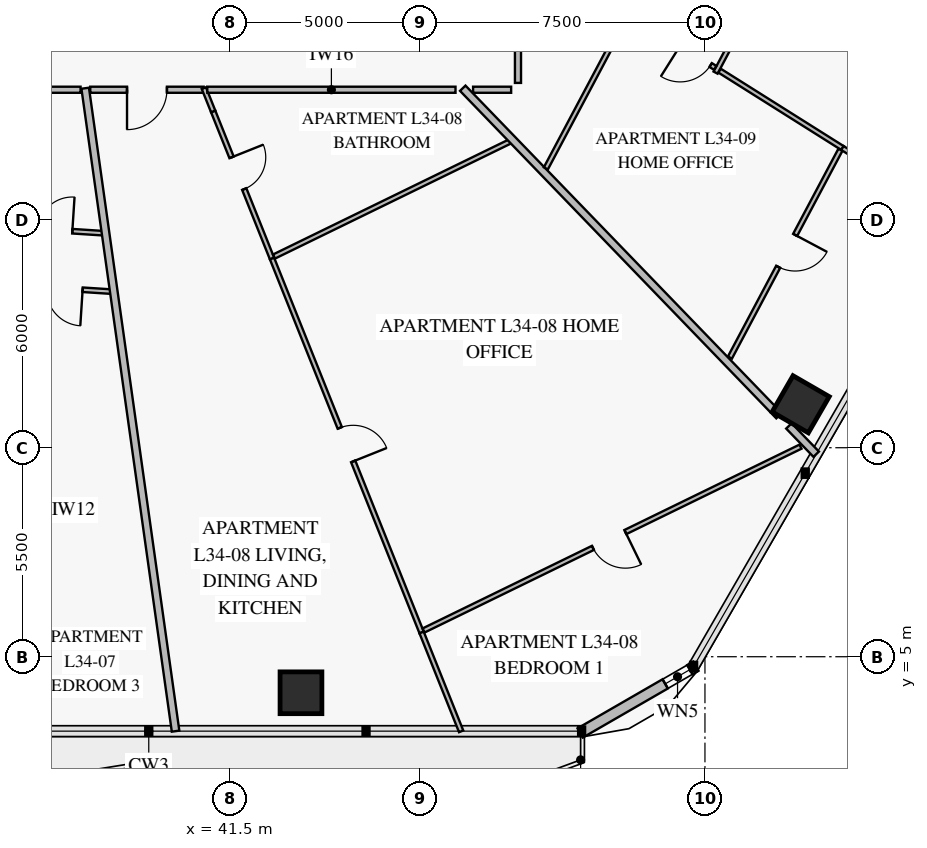
"""IFC4 building model, lengths in metres.
Left out: names, types, materials, properties, quantities, classifications, styles, units other than length and angle.
Written with IfcOpenShell. Run it as: python <this file> out.ifc"""

import sys

from ifc_helpers import new_model, si_unit, direction, frame, frame_2d, origin, origin_2d, place, context, subcontext, project, spatial, rectangle, extrude, element, fill, save


model = new_model("IFC4")
c1 = context("Model", 3, precision=1e-05, world=origin(), true_north=direction((0.0, 1.0)))
c2 = subcontext(c1, "Body", "Model", "MODEL_VIEW")
j1 = project(units=[si_unit("LENGTHUNIT", "METRE"), si_unit("PLANEANGLEUNIT", "RADIAN")], contexts=[c1])
p1 = place(None, origin())
s1 = spatial("IfcSite", under=j1, at=p1, CompositionType="ELEMENT")
p2 = place(p1, origin())
s2 = spatial("IfcBuilding", under=s1, at=p2, CompositionType="ELEMENT")
p3 = place(p2, frame((0.0, 0.0, 138.0)))
s3 = spatial("IfcBuildingStorey", under=s2, at=p3, CompositionType="ELEMENT", Elevation=138.0)
for number, where, z_axis, x_axis in (
    (1, (43.37, 4.052, 0.0), (0.0, 0.0, 1.0), (1.0, 0.0, 0.0)),
    (2, (56.519, 11.643, 0.0), (0.0, 0.0, 1.0), (0.5, 0.866, 0.0)),
):
    element("IfcColumn", number, at=place(p3, frame(where, z_axis=z_axis, x_axis=x_axis)), inside=s3, PredefinedType="COLUMN", context=c2, shape_type="SweptSolid", body=[
        extrude(rectangle(XDim=1.1, YDim=1.1, at=origin_2d()), origin(), (0.0, 0.0, 1.0), 3.55),
    ])
p4 = place(p3, frame((53.761, 4.751, 0.0), z_axis=(0.0, 0.0, 1.0), x_axis=(-0.866007452331, -0.500031091541, 0.0)))
e3 = element("IfcWall", 3, at=p4, inside=s3, PredefinedType="SOLIDWALL", context=c2, shape_type="SweptSolid", body=[
    extrude(rectangle(XDim=3.515, YDim=0.28, at=frame_2d((1.757, 0.0))), origin(), (0.0, 0.0, 1.0), 3.55),
])
p5 = place(p4, frame((0.182, 0.0, 0.85)))
e4 = element("IfcOpeningElement", 4, at=p5, cuts=e3, PredefinedType="OPENING", context=c2, shape_type="SweptSolid", body=[
    extrude(rectangle(XDim=0.75, YDim=1.5, at=frame_2d((0.375, 0.75))), frame((0.0, 0.152, 0.0), z_axis=(0.0, -1.0, 0.0), x_axis=(1.0, 0.0, 0.0)), (0.0, 0.0, 1.0), 0.304),
])
p6 = place(p3, frame((31.788, 16.557, 0.0), z_axis=(0.0, 0.0, 1.0), x_axis=(0.997916701545, -0.064515554547, 0.0)))
e5 = element("IfcWall", 5, at=p6, inside=s3, PredefinedType="PARTITIONING", context=c2, shape_type="SweptSolid", body=[
    extrude(rectangle(XDim=6.414, YDim=0.12, at=frame_2d((3.207, 0.0))), origin(), (0.0, 0.0, 1.0), 2.85),
])
p7 = place(p6, frame((1.548, 0.0, 0.0)))
e6 = element("IfcOpeningElement", 6, at=p7, cuts=e5, PredefinedType="OPENING", context=c2, shape_type="SweptSolid", body=[
    extrude(rectangle(XDim=0.95, YDim=2.1, at=frame_2d((0.475, 1.05))), frame((0.0, 0.072, 0.0), z_axis=(0.0, -1.0, 0.0), x_axis=(1.0, 0.0, 0.0)), (0.0, 0.0, 1.0), 0.144),
])
p8 = place(p6, frame((4.678, 0.0, 0.0)))
e7 = element("IfcOpeningElement", 7, at=p8, cuts=e5, PredefinedType="OPENING", context=c2, shape_type="SweptSolid", body=[
    extrude(rectangle(XDim=0.9, YDim=2.1, at=frame_2d((0.45, 1.05))), frame((0.0, 0.072, 0.0), z_axis=(0.0, -1.0, 0.0), x_axis=(1.0, 0.0, 0.0)), (0.0, 0.0, 1.0), 0.144),
])
p9 = place(p3, frame((31.389, 15.06, 0.0), z_axis=(0.0, 0.0, 1.0), x_axis=(0.997916790239, -0.064514182617, 0.0)))
e8 = element("IfcWall", 8, at=p9, inside=s3, PredefinedType="PARTITIONING", context=c2, shape_type="SweptSolid", body=[
    extrude(rectangle(XDim=7.016, YDim=0.12, at=frame_2d((3.508, 0.0))), origin(), (0.0, 0.0, 1.0), 2.85),
])
p10 = place(p9, frame((0.768, 0.0, 0.0)))
e9 = element("IfcOpeningElement", 9, at=p10, cuts=e8, PredefinedType="OPENING", context=c2, shape_type="SweptSolid", body=[
    extrude(rectangle(XDim=0.95, YDim=2.1, at=frame_2d((0.475, 1.05))), frame((0.0, 0.072, 0.0), z_axis=(0.0, -1.0, 0.0), x_axis=(1.0, 0.0, 0.0)), (0.0, 0.0, 1.0), 0.144),
])
p11 = place(p9, frame((3.033, 0.0, 0.0)))
e10 = element("IfcOpeningElement", 10, at=p11, cuts=e8, PredefinedType="OPENING", context=c2, shape_type="SweptSolid", body=[
    extrude(rectangle(XDim=0.95, YDim=2.1, at=frame_2d((0.475, 1.05))), frame((0.0, 0.072, 0.0), z_axis=(0.0, -1.0, 0.0), x_axis=(1.0, 0.0, 0.0)), (0.0, 0.0, 1.0), 0.144),
])
p12 = place(p9, frame((5.298, 0.0, 0.0)))
e11 = element("IfcOpeningElement", 11, at=p12, cuts=e8, PredefinedType="OPENING", context=c2, shape_type="SweptSolid", body=[
    extrude(rectangle(XDim=0.95, YDim=2.1, at=frame_2d((0.475, 1.05))), frame((0.0, 0.072, 0.0), z_axis=(0.0, -1.0, 0.0), x_axis=(1.0, 0.0, 0.0)), (0.0, 0.0, 1.0), 0.144),
])
p13 = place(p3, frame((41.06, 19.35, 0.0), z_axis=(0.0, 0.0, 1.0), x_axis=(0.371320023402, -0.928504948948, 0.0)))
e12 = element("IfcWall", 12, at=p13, inside=s3, PredefinedType="PARTITIONING", context=c2, shape_type="SweptSolid", body=[
    extrude(rectangle(XDim=4.17, YDim=0.12, at=frame_2d((2.085, 0.0))), origin(), (0.0, 0.0, 1.0), 3.55),
])
p14 = place(p13, frame((1.302, 0.0, 0.0)))
e13 = element("IfcOpeningElement", 13, at=p14, cuts=e12, PredefinedType="OPENING", context=c2, shape_type="SweptSolid", body=[
    extrude(rectangle(XDim=0.9, YDim=2.1, at=frame_2d((0.45, 1.05))), frame((0.0, 0.072, 0.0), z_axis=(0.0, -1.0, 0.0), x_axis=(1.0, 0.0, 0.0)), (0.0, 0.0, 1.0), 0.144),
])
p15 = place(p3, frame((42.608, 15.478, 0.0), z_axis=(0.0, 0.0, 1.0), x_axis=(0.371370817249, -0.928484634281, 0.0)))
e14 = element("IfcWall", 14, at=p15, inside=s3, PredefinedType="PARTITIONING", context=c2, shape_type="SweptSolid", body=[
    extrude(rectangle(XDim=10.598, YDim=0.12, at=frame_2d((5.299, 0.0))), origin(), (0.0, 0.0, 1.0), 2.8),
])
p16 = place(p15, frame((4.799, 0.0, 0.0)))
e15 = element("IfcOpeningElement", 15, at=p16, cuts=e14, PredefinedType="OPENING", context=c2, shape_type="SweptSolid", body=[
    extrude(rectangle(XDim=0.95, YDim=2.1, at=frame_2d((0.475, 1.05))), frame((0.0, 0.072, 0.0), z_axis=(0.0, -1.0, 0.0), x_axis=(1.0, 0.0, 0.0)), (0.0, 0.0, 1.0), 0.144),
])
p17 = place(p3, frame((46.596, 5.691, 0.0), z_axis=(0.0, 0.0, 1.0), x_axis=(0.898799700949, 0.438359552848, 0.0)))
e16 = element("IfcWall", 16, at=p17, inside=s3, PredefinedType="PARTITIONING", context=c2, shape_type="SweptSolid", body=[
    extrude(rectangle(XDim=11.035, YDim=0.12, at=frame_2d((5.517, 0.0))), origin(), (0.0, 0.0, 1.0), 2.8),
])
p18 = place(p17, frame((4.958, 0.0, 0.0)))
e17 = element("IfcOpeningElement", 17, at=p18, cuts=e16, PredefinedType="OPENING", context=c2, shape_type="SweptSolid", body=[
    extrude(rectangle(XDim=0.95, YDim=2.1, at=frame_2d((0.475, 1.05))), frame((0.0, 0.072, 0.0), z_axis=(0.0, -1.0, 0.0), x_axis=(1.0, 0.0, 0.0)), (0.0, 0.0, 1.0), 0.144),
])
p19 = place(p3, frame((37.826, 19.92, 0.0), z_axis=(0.0, 0.0, 1.0), x_axis=(1.0, 0.0, 0.0)))
e18 = element("IfcWall", 18, at=p19, inside=s3, PredefinedType="PARTITIONING", context=c2, shape_type="SweptSolid", body=[
    extrude(rectangle(XDim=2.984, YDim=0.16, at=frame_2d((1.492, 0.0))), origin(), (0.0, 0.0, 1.0), 2.85),
])
p20 = place(p19, frame((0.967, 0.0, 0.0)))
e19 = element("IfcOpeningElement", 19, at=p20, cuts=e18, PredefinedType="OPENING", context=c2, shape_type="SweptSolid", body=[
    extrude(rectangle(XDim=1.05, YDim=2.15, at=frame_2d((0.525, 1.075))), frame((0.0, 0.092, 0.0), z_axis=(0.0, -1.0, 0.0), x_axis=(1.0, 0.0, 0.0)), (0.0, 0.0, 1.0), 0.184),
])
p21 = place(p3, frame((54.28, 20.371, 0.0), z_axis=(0.0, 0.0, 1.0), x_axis=(0.469462335531, 0.882952499015, 0.0)))
e20 = element("IfcWall", 20, at=p21, inside=s3, PredefinedType="PARTITIONING", context=c2, shape_type="SweptSolid", body=[
    extrude(rectangle(XDim=8.602, YDim=0.12, at=frame_2d((4.301, 0.0))), origin(), (0.0, 0.0, 1.0), 2.85),
])
p22 = place(p21, frame((1.252, 0.0, 0.0)))
e21 = element("IfcOpeningElement", 21, at=p22, cuts=e20, PredefinedType="OPENING", context=c2, shape_type="SweptSolid", body=[
    extrude(rectangle(XDim=0.95, YDim=2.1, at=frame_2d((0.475, 1.05))), frame((0.0, 0.072, 0.0), z_axis=(0.0, -1.0, 0.0), x_axis=(1.0, 0.0, 0.0)), (0.0, 0.0, 1.0), 0.144),
])
p23 = place(p21, frame((5.313, 0.0, 0.0)))
e22 = element("IfcOpeningElement", 22, at=p23, cuts=e20, PredefinedType="OPENING", context=c2, shape_type="SweptSolid", body=[
    extrude(rectangle(XDim=0.95, YDim=2.1, at=frame_2d((0.475, 1.05))), frame((0.0, 0.072, 0.0), z_axis=(0.0, -1.0, 0.0), x_axis=(1.0, 0.0, 0.0)), (0.0, 0.0, 1.0), 0.144),
])
p24 = place(p3, frame((52.006, 21.921, 0.0), z_axis=(0.0, 0.0, 1.0), x_axis=(0.846193199802, -0.532876222596, 0.0)))
e23 = element("IfcWall", 23, at=p24, inside=s3, PredefinedType="PARTITIONING", context=c2, shape_type="SweptSolid", body=[
    extrude(rectangle(XDim=2.674, YDim=0.12, at=frame_2d((1.337, 0.0))), origin(), (0.0, 0.0, 1.0), 3.1),
])
p25 = place(p24, frame((1.584, 0.0, 0.0)))
e24 = element("IfcOpeningElement", 24, at=p25, cuts=e23, PredefinedType="OPENING", context=c2, shape_type="SweptSolid", body=[
    extrude(rectangle(XDim=0.95, YDim=2.1, at=frame_2d((0.475, 1.05))), frame((0.0, 0.072, 0.0), z_axis=(0.0, -1.0, 0.0), x_axis=(1.0, 0.0, 0.0)), (0.0, 0.0, 1.0), 0.144),
])
p26 = place(p3, frame((54.384, 20.423, 0.0), z_axis=(0.0, 0.0, 1.0), x_axis=(0.846198695146, -0.532867496037, 0.0)))
e25 = element("IfcWall", 25, at=p26, inside=s3, PredefinedType="PARTITIONING", context=c2, shape_type="SweptSolid", body=[
    extrude(rectangle(XDim=3.821, YDim=0.12, at=frame_2d((1.911, 0.0))), origin(), (0.0, 0.0, 1.0), 3.55),
])
p27 = place(p3, frame((54.657, 12.872, 0.0), z_axis=(0.0, 0.0, 1.0), x_axis=(0.469450167382, 0.882958968664, 0.0)))
e26 = element("IfcWall", 26, at=p27, inside=s3, PredefinedType="PARTITIONING", context=c2, shape_type="SweptSolid", body=[
    extrude(rectangle(XDim=6.193, YDim=0.12, at=frame_2d((3.096, 0.0))), origin(), (0.0, 0.0, 1.0), 2.85),
])
p28 = place(p27, frame((2.706, 0.0, 0.0)))
e27 = element("IfcOpeningElement", 27, at=p28, cuts=e26, PredefinedType="OPENING", context=c2, shape_type="SweptSolid", body=[
    extrude(rectangle(XDim=0.95, YDim=2.1, at=frame_2d((0.475, 1.05))), frame((0.0, 0.072, 0.0), z_axis=(0.0, -1.0, 0.0), x_axis=(1.0, 0.0, 0.0)), (0.0, 0.0, 1.0), 0.144),
])
p29 = place(p3, frame((37.692, 19.96, 0.0), z_axis=(0.0, 0.0, 1.0), x_axis=(0.139170315648, -0.990268460188, 0.0)))
e28 = element("IfcWall", 28, at=p29, inside=s3, PredefinedType="PARTITIONING", context=c2, shape_type="SweptSolid", body=[
    extrude(rectangle(XDim=17.085, YDim=0.2, at=frame_2d((8.542, 0.0))), origin(), (0.0, 0.0, 1.0), 2.8),
])
p30 = place(p3, frame((40.814, 19.963, 0.0), z_axis=(0.0, 0.0, 1.0), x_axis=(0.371581909809, -0.928400174657, 0.0)))
e29 = element("IfcWall", 29, at=p30, inside=s3, PredefinedType="PARTITIONING", context=c2, shape_type="SweptSolid", body=[
    extrude(rectangle(XDim=0.66, YDim=0.12, at=frame_2d((0.33, 0.0))), origin(), (0.0, 0.0, 1.0), 3.55),
])
p31 = place(p3, frame((46.544, 5.638, 0.0), z_axis=(0.0, 0.0, 1.0), x_axis=(0.371420726866, -0.928464670116, 0.0)))
e30 = element("IfcWall", 30, at=p31, inside=s3, PredefinedType="PARTITIONING", context=c2, shape_type="SweptSolid", body=[
    extrude(rectangle(XDim=2.802, YDim=0.12, at=frame_2d((1.401, 0.0))), origin(), (0.0, 0.0, 1.0), 3.55),
])
p32 = place(p3, frame((42.66, 15.531, 0.0), z_axis=(0.0, 0.0, 1.0), x_axis=(0.898796900982, 0.438365293773, 0.0)))
e31 = element("IfcWall", 31, at=p32, inside=s3, PredefinedType="PARTITIONING", context=c2, shape_type="SweptSolid", body=[
    extrude(rectangle(XDim=6.926, YDim=0.12, at=frame_2d((3.463, 0.0))), origin(), (0.0, 0.0, 1.0), 3.55),
])
p33 = place(p3, frame((47.627, 19.96, 0.0), z_axis=(0.0, 0.0, 1.0), x_axis=(0.694659610847, -0.719338602508, 0.0)))
e32 = element("IfcWall", 32, at=p33, inside=s3, PredefinedType="PARTITIONING", context=c2, shape_type="SweptSolid", body=[
    extrude(rectangle(XDim=11.98, YDim=0.2, at=frame_2d((5.99, 0.0))), origin(), (0.0, 0.0, 1.0), 2.8),
])
p34 = place(p3, frame((56.209, 11.073, 0.0), z_axis=(0.0, 0.0, 1.0), x_axis=(0.694716755503, -0.719283413977, 0.0)))
e33 = element("IfcWall", 33, at=p34, inside=s3, PredefinedType="PARTITIONING", context=c2, shape_type="SweptSolid", body=[
    extrude(rectangle(XDim=1.033, YDim=0.2, at=frame_2d((0.517, 0.0))), origin(), (0.0, 0.0, 1.0), 3.55),
])
p35 = place(p3, frame((55.851, 23.181, 0.0), z_axis=(0.0, 0.0, 1.0), x_axis=(0.913861683545, -0.406025643707, 0.0)))
e34 = element("IfcWall", 34, at=p35, inside=s3, PredefinedType="PARTITIONING", context=c2, shape_type="SweptSolid", body=[
    extrude(rectangle(XDim=7.429, YDim=0.12, at=frame_2d((3.714, 0.0))), origin(), (0.0, 0.0, 1.0), 2.8),
])
p36 = place(p3, frame((57.618, 18.387, 0.0), z_axis=(0.0, 0.0, 1.0), x_axis=(0.846190145903, -0.532881072076, 0.0)))
e35 = element("IfcWall", 35, at=p36, inside=s3, PredefinedType="PARTITIONING", context=c2, shape_type="SweptSolid", body=[
    extrude(rectangle(XDim=3.438, YDim=0.12, at=frame_2d((1.719, 0.0))), origin(), (0.0, 0.0, 1.0), 2.8),
])
p37 = place(p3, frame((49.814, 17.851, 0.0), z_axis=(0.0, 0.0, 1.0), x_axis=(0.469430775165, 0.882969278813, 0.0)))
e36 = element("IfcWall", 36, at=p37, inside=s3, PredefinedType="PARTITIONING", context=c2, shape_type="SweptSolid", body=[
    extrude(rectangle(XDim=4.556, YDim=0.12, at=frame_2d((2.278, 0.0))), origin(), (0.0, 0.0, 1.0), 2.85),
])
p38 = place(p3, frame((35.854, 19.92, 0.0), z_axis=(0.0, 0.0, 1.0), x_axis=(1.0, 0.0, 0.0)))
e37 = element("IfcWall", 37, at=p38, inside=s3, PredefinedType="PARTITIONING", context=c2, shape_type="SweptSolid", body=[
    extrude(rectangle(XDim=1.716, YDim=0.16, at=frame_2d((0.858, 0.0))), origin(), (0.0, 0.0, 1.0), 3.55),
])
p39 = place(p3, frame((40.905, 19.92, 0.0), z_axis=(0.0, 0.0, 1.0), x_axis=(1.0, 0.0, 0.0)))
e38 = element("IfcWall", 38, at=p39, inside=s3, PredefinedType="PARTITIONING", context=c2, shape_type="SweptSolid", body=[
    extrude(rectangle(XDim=6.531, YDim=0.16, at=frame_2d((3.266, 0.0))), origin(), (0.0, 0.0, 1.0), 3.55),
])
p40 = place(p3, frame((49.08, 20.1, 0.0), z_axis=(0.0, 0.0, 1.0), x_axis=(0.0, 1.0, 0.0)))
e39 = element("IfcWall", 39, at=p40, inside=s3, PredefinedType="PARTITIONING", context=c2, shape_type="SweptSolid", body=[
    extrude(rectangle(XDim=3.583, YDim=0.16, at=frame_2d((1.792, 0.0))), origin(), (0.0, 0.0, 1.0), 3.55),
])
p41 = place(p3, frame((47.899, 19.92, 0.0), z_axis=(0.0, 0.0, 1.0), x_axis=(1.0, 0.0, 0.0)))
e40 = element("IfcWall", 40, at=p41, inside=s3, PredefinedType="PARTITIONING", context=c2, shape_type="SweptSolid", body=[
    extrude(rectangle(XDim=1.001, YDim=0.16, at=frame_2d((0.5, 0.0))), origin(), (0.0, 0.0, 1.0), 2.85),
])
p42 = place(p5, origin())
e41 = element("IfcWindow", 41, at=p42, inside=s3, PartitioningType="SINGLE_PANEL", PredefinedType="WINDOW", context=c2, shape_type="SweptSolid", body=[
    extrude(rectangle(XDim=0.75, YDim=1.5, at=frame_2d((0.375, 0.75))), frame((0.0, 0.03, 0.0), z_axis=(0.0, -1.0, 0.0), x_axis=(1.0, 0.0, 0.0)), (0.0, 0.0, 1.0), 0.06),
])
fill(e4, e41)
p43 = place(p8, origin())
e42 = element("IfcDoor", 42, at=p43, inside=s3, OperationType="SINGLE_SWING_RIGHT", PredefinedType="DOOR", context=c2, shape_type="SweptSolid", body=[
    extrude(rectangle(XDim=0.9, YDim=2.1, at=frame_2d((0.45, 1.05))), frame((0.0, 0.025, 0.0), z_axis=(0.0, -1.0, 0.0), x_axis=(1.0, 0.0, 0.0)), (0.0, 0.0, 1.0), 0.05),
])
fill(e7, e42)
p44 = place(p12, frame((0.95, 0.0, 0.0), z_axis=(0.0, 0.0, 1.0), x_axis=(-1.0, 0.0, 0.0)))
e43 = element("IfcDoor", 43, at=p44, inside=s3, OperationType="SINGLE_SWING_LEFT", PredefinedType="DOOR", context=c2, shape_type="SweptSolid", body=[
    extrude(rectangle(XDim=0.95, YDim=2.1, at=frame_2d((0.475, 1.05))), frame((0.0, 0.025, 0.0), z_axis=(0.0, -1.0, 0.0), x_axis=(1.0, 0.0, 0.0)), (0.0, 0.0, 1.0), 0.05),
])
fill(e11, e43)
p45 = place(p14, origin())
e44 = element("IfcDoor", 44, at=p45, inside=s3, OperationType="SINGLE_SWING_LEFT", PredefinedType="DOOR", context=c2, shape_type="SweptSolid", body=[
    extrude(rectangle(XDim=0.9, YDim=2.1, at=frame_2d((0.45, 1.05))), frame((0.0, 0.025, 0.0), z_axis=(0.0, -1.0, 0.0), x_axis=(1.0, 0.0, 0.0)), (0.0, 0.0, 1.0), 0.05),
])
fill(e13, e44)
p46 = place(p16, origin())
e45 = element("IfcDoor", 45, at=p46, inside=s3, OperationType="SINGLE_SWING_RIGHT", PredefinedType="DOOR", context=c2, shape_type="SweptSolid", body=[
    extrude(rectangle(XDim=0.95, YDim=2.1, at=frame_2d((0.475, 1.05))), frame((0.0, 0.025, 0.0), z_axis=(0.0, -1.0, 0.0), x_axis=(1.0, 0.0, 0.0)), (0.0, 0.0, 1.0), 0.05),
])
fill(e15, e45)
p47 = place(p18, frame((0.95, 0.0, 0.0), z_axis=(0.0, 0.0, 1.0), x_axis=(-1.0, 0.0, 0.0)))
e46 = element("IfcDoor", 46, at=p47, inside=s3, OperationType="SINGLE_SWING_LEFT", PredefinedType="DOOR", context=c2, shape_type="SweptSolid", body=[
    extrude(rectangle(XDim=0.95, YDim=2.1, at=frame_2d((0.475, 1.05))), frame((0.0, 0.025, 0.0), z_axis=(0.0, -1.0, 0.0), x_axis=(1.0, 0.0, 0.0)), (0.0, 0.0, 1.0), 0.05),
])
fill(e17, e46)
p48 = place(p20, frame((1.05, 0.0, 0.0), z_axis=(0.0, 0.0, 1.0), x_axis=(-1.0, 0.0, 0.0)))
e47 = element("IfcDoor", 47, at=p48, inside=s3, OperationType="SINGLE_SWING_RIGHT", PredefinedType="DOOR", context=c2, shape_type="SweptSolid", body=[
    extrude(rectangle(XDim=1.05, YDim=2.15, at=frame_2d((0.525, 1.075))), frame((0.0, 0.025, 0.0), z_axis=(0.0, -1.0, 0.0), x_axis=(1.0, 0.0, 0.0)), (0.0, 0.0, 1.0), 0.05),
])
fill(e19, e47)
p49 = place(p25, frame((0.95, 0.0, 0.0), z_axis=(0.0, 0.0, 1.0), x_axis=(-1.0, 0.0, 0.0)))
e48 = element("IfcDoor", 48, at=p49, inside=s3, OperationType="SINGLE_SWING_RIGHT", PredefinedType="DOOR", context=c2, shape_type="SweptSolid", body=[
    extrude(rectangle(XDim=0.95, YDim=2.1, at=frame_2d((0.475, 1.05))), frame((0.0, 0.025, 0.0), z_axis=(0.0, -1.0, 0.0), x_axis=(1.0, 0.0, 0.0)), (0.0, 0.0, 1.0), 0.05),
])
fill(e24, e48)
p50 = place(p28, frame((0.95, 0.0, 0.0), z_axis=(0.0, 0.0, 1.0), x_axis=(-1.0, 0.0, 0.0)))
e49 = element("IfcDoor", 49, at=p50, inside=s3, OperationType="SINGLE_SWING_LEFT", PredefinedType="DOOR", context=c2, shape_type="SweptSolid", body=[
    extrude(rectangle(XDim=0.95, YDim=2.1, at=frame_2d((0.475, 1.05))), frame((0.0, 0.025, 0.0), z_axis=(0.0, -1.0, 0.0), x_axis=(1.0, 0.0, 0.0)), (0.0, 0.0, 1.0), 0.05),
])
fill(e27, e49)
save(model, sys.argv[1])
